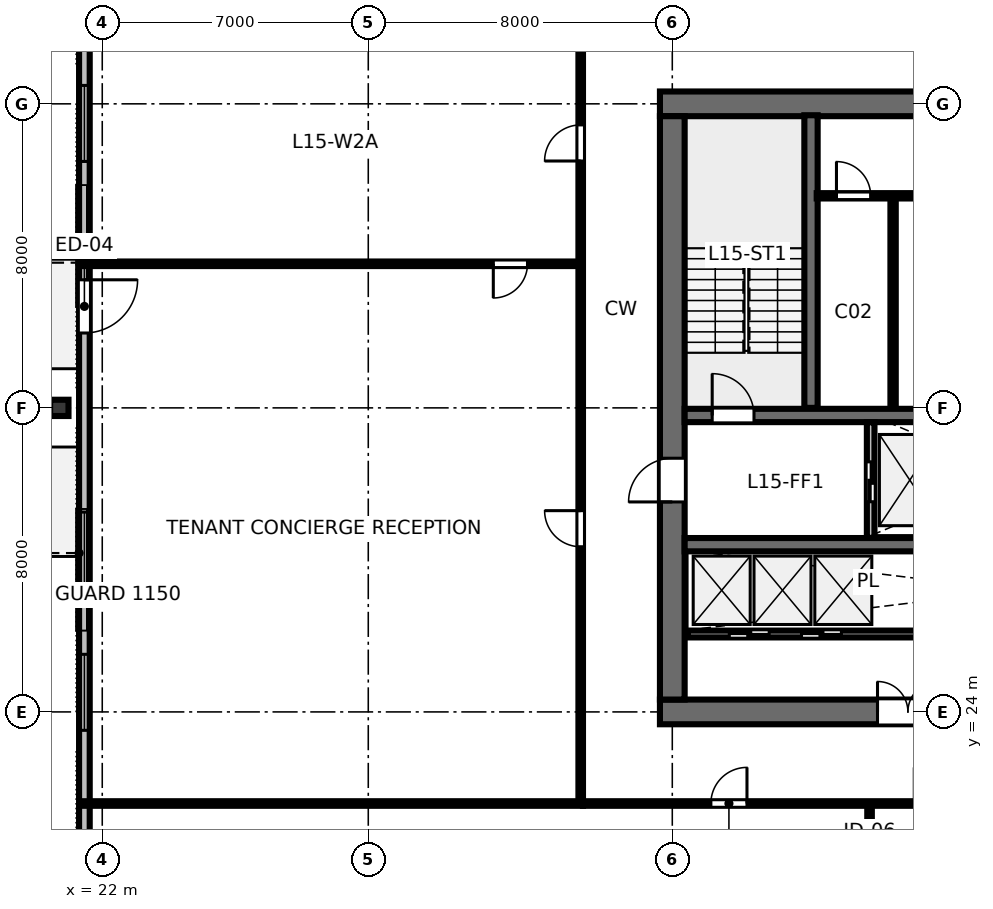
"""IFC4 building model, lengths in metres.
Left out: names, types, materials, properties, quantities, classifications, styles, units other than length and angle.
Written with IfcOpenShell. Run it as: python <this file> out.ifc"""

import sys

from ifc_helpers import new_model, si_unit, direction, frame, frame_2d, origin, origin_2d, place, context, subcontext, project, spatial, rectangle, i_section, extrude, element, fill, save


model = new_model("IFC4")
c1 = context("Model", 3, precision=1e-05, world=origin(), true_north=direction((0.0, 1.0)))
c2 = subcontext(c1, "Body", "Model", "MODEL_VIEW")
j1 = project(units=[si_unit("LENGTHUNIT", "METRE"), si_unit("PLANEANGLEUNIT", "RADIAN")], contexts=[c1])
p1 = place(None, origin())
s1 = spatial("IfcSite", under=j1, at=p1, CompositionType="ELEMENT")
p2 = place(p1, origin())
s2 = spatial("IfcBuilding", under=s1, at=p2, CompositionType="ELEMENT")
p3 = place(p2, frame((0.0, 0.0, 60.4)))
s3 = spatial("IfcBuildingStorey", under=s2, at=p3, CompositionType="ELEMENT", Elevation=60.4)
p4 = place(p3, frame((36.675, 24.0, 0.0), z_axis=(0.0, 0.0, 1.0), x_axis=(1.0, 0.0, 0.0)))
e1 = element("IfcWall", 1, at=p4, inside=s3, PredefinedType="SHEAR", context=c2, shape_type="SweptSolid", body=[
    extrude(rectangle(XDim=18.65, YDim=0.65, at=frame_2d((9.325, 0.0))), origin(), (0.0, 0.0, 1.0), 3.36),
])
p5 = place(p4, frame((5.725, 0.0, 0.0)))
e2 = element("IfcOpeningElement", 2, at=p5, cuts=e1, PredefinedType="OPENING", context=c2, shape_type="SweptSolid", body=[
    extrude(rectangle(XDim=1.6, YDim=2.15, at=frame_2d((0.8, 1.075))), frame((0.0, 0.335, 0.0), z_axis=(0.0, -1.0, 0.0), x_axis=(1.0, 0.0, 0.0)), (0.0, 0.0, 1.0), 0.67),
])
p6 = place(p4, frame((12.125, 0.0, 0.0)))
e3 = element("IfcOpeningElement", 3, at=p6, cuts=e1, PredefinedType="OPENING", context=c2, shape_type="SweptSolid", body=[
    extrude(rectangle(XDim=1.6, YDim=2.15, at=frame_2d((0.8, 1.075))), frame((0.0, 0.335, 0.0), z_axis=(0.0, -1.0, 0.0), x_axis=(1.0, 0.0, 0.0)), (0.0, 0.0, 1.0), 0.67),
])
p7 = place(p3, frame((36.675, 40.0, 0.0), z_axis=(0.0, 0.0, 1.0), x_axis=(1.0, 0.0, 0.0)))
e4 = element("IfcWall", 4, at=p7, inside=s3, PredefinedType="SHEAR", context=c2, shape_type="SweptSolid", body=[
    extrude(rectangle(XDim=18.65, YDim=0.65, at=frame_2d((9.325, 0.0))), origin(), (0.0, 0.0, 1.0), 3.36),
])
p8 = place(p7, frame((8.825, 0.0, 0.0)))
e5 = element("IfcOpeningElement", 5, at=p8, cuts=e4, PredefinedType="OPENING", context=c2, shape_type="SweptSolid", body=[
    extrude(rectangle(XDim=1.0, YDim=2.15, at=frame_2d((0.5, 1.075))), frame((0.0, 0.335, 0.0), z_axis=(0.0, -1.0, 0.0), x_axis=(1.0, 0.0, 0.0)), (0.0, 0.0, 1.0), 0.67),
])
p9 = place(p3, frame((37.0, 24.325, 0.0), z_axis=(0.0, 0.0, 1.0), x_axis=(0.0, 1.0, 0.0)))
e6 = element("IfcWall", 6, at=p9, inside=s3, PredefinedType="SHEAR", context=c2, shape_type="SweptSolid", body=[
    extrude(rectangle(XDim=15.35, YDim=0.65, at=frame_2d((7.675, 0.0))), origin(), (0.0, 0.0, 1.0), 3.36),
])
p10 = place(p9, frame((5.2, 0.0, 0.0)))
e7 = element("IfcOpeningElement", 7, at=p10, cuts=e6, PredefinedType="OPENING", context=c2, shape_type="SweptSolid", body=[
    extrude(rectangle(XDim=1.15, YDim=2.15, at=frame_2d((0.575, 1.075))), frame((0.0, 0.335, 0.0), z_axis=(0.0, -1.0, 0.0), x_axis=(1.0, 0.0, 0.0)), (0.0, 0.0, 1.0), 0.67),
])
p11 = place(p3, frame((37.325, 31.8, 0.0), z_axis=(0.0, 0.0, 1.0), x_axis=(1.0, 0.0, 0.0)))
e8 = element("IfcWall", 8, at=p11, inside=s3, PredefinedType="SHEAR", context=c2, shape_type="SweptSolid", body=[
    extrude(rectangle(XDim=17.35, YDim=0.35, at=frame_2d((8.675, 0.0))), origin(), (0.0, 0.0, 1.0), 3.36),
])
p12 = place(p11, frame((0.725, 0.0, 0.0)))
e9 = element("IfcOpeningElement", 9, at=p12, cuts=e8, PredefinedType="OPENING", context=c2, shape_type="SweptSolid", body=[
    extrude(rectangle(XDim=1.1, YDim=2.15, at=frame_2d((0.55, 1.075))), frame((0.0, 0.185, 0.0), z_axis=(0.0, -1.0, 0.0), x_axis=(1.0, 0.0, 0.0)), (0.0, 0.0, 1.0), 0.37),
])
p13 = place(p11, frame((14.625, 0.0, 0.0)))
e10 = element("IfcOpeningElement", 10, at=p13, cuts=e8, PredefinedType="OPENING", context=c2, shape_type="SweptSolid", body=[
    extrude(rectangle(XDim=1.1, YDim=2.15, at=frame_2d((0.55, 1.075))), frame((0.0, 0.185, 0.0), z_axis=(0.0, -1.0, 0.0), x_axis=(1.0, 0.0, 0.0)), (0.0, 0.0, 1.0), 0.37),
])
p14 = place(p3, frame((37.325, 28.4, 0.0), z_axis=(0.0, 0.0, 1.0), x_axis=(1.0, 0.0, 0.0)))
e11 = element("IfcWall", 11, at=p14, inside=s3, PredefinedType="SHEAR", context=c2, shape_type="SweptSolid", body=[
    extrude(rectangle(XDim=17.35, YDim=0.35, at=frame_2d((8.675, 0.0))), origin(), (0.0, 0.0, 1.0), 3.36),
])
p15 = place(p3, frame((20.87, 32.0, 0.0), z_axis=(0.0, 0.0, 1.0), x_axis=(0.0, 1.0, 0.0)))
e12 = element("IfcColumn", 12, at=p15, inside=s3, PredefinedType="COLUMN", context=c2, shape_type="SweptSolid", body=[
    extrude(i_section(OverallWidth=0.428, OverallDepth=0.483, WebThickness=0.051, FlangeThickness=0.082, FilletRadius=0.025, at=origin_2d()), origin(), (0.0, 0.0, 1.0), 3.358),
])
p16 = place(p3, frame((21.53, 49.94, 0.0), z_axis=(0.0, 0.0, 1.0), x_axis=(0.0, -1.0, 0.0)))
e13 = element("IfcWall", 13, at=p16, inside=s3, PredefinedType="STANDARD", context=c2, shape_type="SweptSolid", body=[
    extrude(rectangle(XDim=35.88, YDim=0.28, at=frame_2d((17.94, 0.0))), origin(), (0.0, 0.0, 1.0), 3.36),
])
p17 = place(p16, frame((14.57, 0.0, 0.0)))
e14 = element("IfcOpeningElement", 14, at=p17, cuts=e13, PredefinedType="OPENING", context=c2, shape_type="SweptSolid", body=[
    extrude(rectangle(XDim=1.4, YDim=2.15, at=frame_2d((0.7, 1.075))), frame((0.0, 0.15, 0.0), z_axis=(0.0, -1.0, 0.0), x_axis=(1.0, 0.0, 0.0)), (0.0, 0.0, 1.0), 0.3),
])
p18 = place(p16, frame((1.971, 0.0, 0.8)))
e15 = element("IfcOpeningElement", 15, at=p18, cuts=e13, PredefinedType="OPENING", context=c2, shape_type="SweptSolid", body=[
    extrude(rectangle(XDim=2.0, YDim=1.95, at=frame_2d((1.0, 0.975))), frame((0.0, 0.15, 0.0), z_axis=(0.0, -1.0, 0.0), x_axis=(1.0, 0.0, 0.0)), (0.0, 0.0, 1.0), 0.3),
])
p19 = place(p16, frame((9.456, 0.0, 0.8)))
e16 = element("IfcOpeningElement", 16, at=p19, cuts=e13, PredefinedType="OPENING", context=c2, shape_type="SweptSolid", body=[
    extrude(rectangle(XDim=2.0, YDim=1.95, at=frame_2d((1.0, 0.975))), frame((0.0, 0.15, 0.0), z_axis=(0.0, -1.0, 0.0), x_axis=(1.0, 0.0, 0.0)), (0.0, 0.0, 1.0), 0.3),
])
p20 = place(p16, frame((20.682, 0.0, 0.8)))
e17 = element("IfcOpeningElement", 17, at=p20, cuts=e13, PredefinedType="OPENING", context=c2, shape_type="SweptSolid", body=[
    extrude(rectangle(XDim=2.0, YDim=1.95, at=frame_2d((1.0, 0.975))), frame((0.0, 0.15, 0.0), z_axis=(0.0, -1.0, 0.0), x_axis=(1.0, 0.0, 0.0)), (0.0, 0.0, 1.0), 0.3),
])
p21 = place(p16, frame((24.424, 0.0, 0.8)))
e18 = element("IfcOpeningElement", 18, at=p21, cuts=e13, PredefinedType="OPENING", context=c2, shape_type="SweptSolid", body=[
    extrude(rectangle(XDim=2.0, YDim=1.95, at=frame_2d((1.0, 0.975))), frame((0.0, 0.15, 0.0), z_axis=(0.0, -1.0, 0.0), x_axis=(1.0, 0.0, 0.0)), (0.0, 0.0, 1.0), 0.3),
])
p22 = place(p16, frame((31.909, 0.0, 0.8)))
e19 = element("IfcOpeningElement", 19, at=p22, cuts=e13, PredefinedType="OPENING", context=c2, shape_type="SweptSolid", body=[
    extrude(rectangle(XDim=2.0, YDim=1.95, at=frame_2d((1.0, 0.975))), frame((0.0, 0.15, 0.0), z_axis=(0.0, -1.0, 0.0), x_axis=(1.0, 0.0, 0.0)), (0.0, 0.0, 1.0), 0.3),
])
p23 = place(p3, frame((40.65, 32.0, 0.0), z_axis=(0.0, 0.0, 1.0), x_axis=(0.0, 1.0, 0.0)))
e20 = element("IfcWall", 20, at=p23, inside=s3, PredefinedType="SHEAR", context=c2, shape_type="SweptSolid", body=[
    extrude(rectangle(XDim=7.7, YDim=0.35, at=frame_2d((3.85, 0.0))), origin(), (0.0, 0.0, 1.0), 3.6),
])
p24 = place(p3, frame((42.81, 32.05, 0.0), z_axis=(0.0, 0.0, 1.0), x_axis=(0.0, 1.0, 0.0)))
e21 = element("IfcWall", 21, at=p24, inside=s3, PredefinedType="PARTITIONING", context=c2, shape_type="SweptSolid", body=[
    extrude(rectangle(XDim=5.5, YDim=0.14, at=frame_2d((2.75, 0.0))), origin(), (0.0, 0.0, 1.0), 3.36),
])
p25 = place(p3, frame((40.8, 37.58, 0.0), z_axis=(0.0, 0.0, 1.0), x_axis=(1.0, 0.0, 0.0)))
e22 = element("IfcWall", 22, at=p25, inside=s3, PredefinedType="PARTITIONING", context=c2, shape_type="SweptSolid", body=[
    extrude(rectangle(XDim=10.4, YDim=0.14, at=frame_2d((5.2, 0.0))), origin(), (0.0, 0.0, 1.0), 3.36),
])
p26 = place(p25, frame((0.52, 0.0, 0.0)))
e23 = element("IfcOpeningElement", 23, at=p26, cuts=e22, PredefinedType="OPENING", context=c2, shape_type="SweptSolid", body=[
    extrude(rectangle(XDim=0.9, YDim=2.15, at=frame_2d((0.45, 1.075))), frame((0.0, 0.08, 0.0), z_axis=(0.0, -1.0, 0.0), x_axis=(1.0, 0.0, 0.0)), (0.0, 0.0, 1.0), 0.16),
])
p27 = place(p25, frame((2.6, 0.0, 0.0)))
e24 = element("IfcOpeningElement", 24, at=p27, cuts=e22, PredefinedType="OPENING", context=c2, shape_type="SweptSolid", body=[
    extrude(rectangle(XDim=0.9, YDim=2.15, at=frame_2d((0.45, 1.075))), frame((0.0, 0.08, 0.0), z_axis=(0.0, -1.0, 0.0), x_axis=(1.0, 0.0, 0.0)), (0.0, 0.0, 1.0), 0.16),
])
p28 = place(p25, frame((4.68, 0.0, 0.0)))
e25 = element("IfcOpeningElement", 25, at=p28, cuts=e22, PredefinedType="OPENING", context=c2, shape_type="SweptSolid", body=[
    extrude(rectangle(XDim=0.92, YDim=2.15, at=frame_2d((0.46, 1.075))), frame((0.0, 0.08, 0.0), z_axis=(0.0, -1.0, 0.0), x_axis=(1.0, 0.0, 0.0)), (0.0, 0.0, 1.0), 0.16),
])
p29 = place(p25, frame((6.76, 0.0, 0.0)))
e26 = element("IfcOpeningElement", 26, at=p29, cuts=e22, PredefinedType="OPENING", context=c2, shape_type="SweptSolid", body=[
    extrude(rectangle(XDim=0.9, YDim=2.15, at=frame_2d((0.45, 1.075))), frame((0.0, 0.08, 0.0), z_axis=(0.0, -1.0, 0.0), x_axis=(1.0, 0.0, 0.0)), (0.0, 0.0, 1.0), 0.16),
])
p30 = place(p25, frame((8.84, 0.0, 0.0)))
e27 = element("IfcOpeningElement", 27, at=p30, cuts=e22, PredefinedType="OPENING", context=c2, shape_type="SweptSolid", body=[
    extrude(rectangle(XDim=0.9, YDim=2.15, at=frame_2d((0.45, 1.075))), frame((0.0, 0.08, 0.0), z_axis=(0.0, -1.0, 0.0), x_axis=(1.0, 0.0, 0.0)), (0.0, 0.0, 1.0), 0.16),
])
p31 = place(p3, frame((42.22, 28.58, 0.0), z_axis=(0.0, 0.0, 1.0), x_axis=(0.0, 1.0, 0.0)))
e28 = element("IfcWall", 28, at=p31, inside=s3, PredefinedType="PARTITIONING", context=c2, shape_type="SweptSolid", body=[
    extrude(rectangle(XDim=3.04, YDim=0.2, at=frame_2d((1.52, 0.0))), origin(), (0.0, 0.0, 1.0), 3.36),
])
p32 = place(p31, frame((0.95, 0.0, 0.0)))
e29 = element("IfcOpeningElement", 29, at=p32, cuts=e28, PredefinedType="OPENING", context=c2, shape_type="SweptSolid", body=[
    extrude(rectangle(XDim=1.05, YDim=2.15, at=frame_2d((0.525, 1.075))), frame((0.0, 0.11, 0.0), z_axis=(0.0, -1.0, 0.0), x_axis=(1.0, 0.0, 0.0)), (0.0, 0.0, 1.0), 0.22),
])
p33 = place(p3, frame((37.4, 26.05, 0.0), z_axis=(0.0, 0.0, 1.0), x_axis=(1.0, 0.0, 0.0)))
e30 = element("IfcWall", 30, at=p33, inside=s3, PredefinedType="PARTITIONING", context=c2, shape_type="SweptSolid", body=[
    extrude(rectangle(XDim=17.2, YDim=0.18, at=frame_2d((8.6, 0.0))), origin(), (0.0, 0.0, 1.0), 3.36),
])
p34 = place(p33, frame((1.1, 0.0, 0.0)))
e31 = element("IfcOpeningElement", 31, at=p34, cuts=e30, PredefinedType="OPENING", context=c2, shape_type="SweptSolid", body=[
    extrude(rectangle(XDim=1.05, YDim=2.15, at=frame_2d((0.525, 1.075))), frame((0.0, 0.1, 0.0), z_axis=(0.0, -1.0, 0.0), x_axis=(1.0, 0.0, 0.0)), (0.0, 0.0, 1.0), 0.2),
])
p35 = place(p33, frame((3.0, 0.0, 0.0)))
e32 = element("IfcOpeningElement", 32, at=p35, cuts=e30, PredefinedType="OPENING", context=c2, shape_type="SweptSolid", body=[
    extrude(rectangle(XDim=1.05, YDim=2.15, at=frame_2d((0.525, 1.075))), frame((0.0, 0.1, 0.0), z_axis=(0.0, -1.0, 0.0), x_axis=(1.0, 0.0, 0.0)), (0.0, 0.0, 1.0), 0.2),
])
p36 = place(p3, frame((42.191, 21.59, 0.0), z_axis=(0.0, 0.0, 1.0), x_axis=(0.0, -1.0, 0.0)))
e33 = element("IfcWall", 33, at=p36, inside=s3, PredefinedType="PARTITIONING", context=c2, shape_type="SweptSolid", body=[
    extrude(rectangle(XDim=11.11, YDim=0.12, at=frame_2d((5.555, 0.0))), origin(), (0.0, 0.0, 1.0), 2.64),
])
p37 = place(p36, frame((1.4, 0.0, 0.0)))
e34 = element("IfcOpeningElement", 34, at=p37, cuts=e33, PredefinedType="OPENING", context=c2, shape_type="SweptSolid", body=[
    extrude(rectangle(XDim=0.9, YDim=2.15, at=frame_2d((0.45, 1.075))), frame((0.0, 0.07, 0.0), z_axis=(0.0, -1.0, 0.0), x_axis=(1.0, 0.0, 0.0)), (0.0, 0.0, 1.0), 0.14),
])
p38 = place(p3, frame((34.65, 21.59, 0.0), z_axis=(0.0, 0.0, 1.0), x_axis=(1.0, 0.0, 0.0)))
e35 = element("IfcWall", 35, at=p38, inside=s3, PredefinedType="PARTITIONING", context=c2, shape_type="SweptSolid", body=[
    extrude(rectangle(XDim=22.7, YDim=0.12, at=frame_2d((11.35, 0.0))), origin(), (0.0, 0.0, 1.0), 2.64),
])
p39 = place(p38, frame((3.365, 0.0, 0.0)))
e36 = element("IfcOpeningElement", 36, at=p39, cuts=e35, PredefinedType="OPENING", context=c2, shape_type="SweptSolid", body=[
    extrude(rectangle(XDim=0.95, YDim=2.15, at=frame_2d((0.475, 1.075))), frame((0.0, 0.07, 0.0), z_axis=(0.0, -1.0, 0.0), x_axis=(1.0, 0.0, 0.0)), (0.0, 0.0, 1.0), 0.14),
])
p40 = place(p38, frame((8.718, 0.0, 0.0)))
e37 = element("IfcOpeningElement", 37, at=p40, cuts=e35, PredefinedType="OPENING", context=c2, shape_type="SweptSolid", body=[
    extrude(rectangle(XDim=0.95, YDim=2.15, at=frame_2d((0.475, 1.075))), frame((0.0, 0.07, 0.0), z_axis=(0.0, -1.0, 0.0), x_axis=(1.0, 0.0, 0.0)), (0.0, 0.0, 1.0), 0.14),
])
p41 = place(p38, frame((13.651, 0.0, 0.0)))
e38 = element("IfcOpeningElement", 38, at=p41, cuts=e35, PredefinedType="OPENING", context=c2, shape_type="SweptSolid", body=[
    extrude(rectangle(XDim=0.95, YDim=2.15, at=frame_2d((0.475, 1.075))), frame((0.0, 0.07, 0.0), z_axis=(0.0, -1.0, 0.0), x_axis=(1.0, 0.0, 0.0)), (0.0, 0.0, 1.0), 0.14),
])
p42 = place(p38, frame((19.509, 0.0, 0.0)))
e39 = element("IfcOpeningElement", 39, at=p42, cuts=e35, PredefinedType="OPENING", context=c2, shape_type="SweptSolid", body=[
    extrude(rectangle(XDim=0.95, YDim=2.15, at=frame_2d((0.475, 1.075))), frame((0.0, 0.07, 0.0), z_axis=(0.0, -1.0, 0.0), x_axis=(1.0, 0.0, 0.0)), (0.0, 0.0, 1.0), 0.14),
])
p43 = place(p3, frame((34.59, 35.791, 0.0), z_axis=(0.0, 0.0, 1.0), x_axis=(-1.0, 0.0, 0.0)))
e40 = element("IfcWall", 40, at=p43, inside=s3, PredefinedType="PARTITIONING", context=c2, shape_type="SweptSolid", body=[
    extrude(rectangle(XDim=13.06, YDim=0.12, at=frame_2d((6.53, 0.0))), origin(), (0.0, 0.0, 1.0), 2.64),
])
p44 = place(p43, frame((1.4, 0.0, 0.0)))
e41 = element("IfcOpeningElement", 41, at=p44, cuts=e40, PredefinedType="OPENING", context=c2, shape_type="SweptSolid", body=[
    extrude(rectangle(XDim=0.9, YDim=2.15, at=frame_2d((0.45, 1.075))), frame((0.0, 0.07, 0.0), z_axis=(0.0, -1.0, 0.0), x_axis=(1.0, 0.0, 0.0)), (0.0, 0.0, 1.0), 0.14),
])
p45 = place(p3, frame((34.59, 21.65, 0.0), z_axis=(0.0, 0.0, 1.0), x_axis=(0.0, 1.0, 0.0)))
e42 = element("IfcWall", 42, at=p45, inside=s3, PredefinedType="PARTITIONING", context=c2, shape_type="SweptSolid", body=[
    extrude(rectangle(XDim=20.7, YDim=0.12, at=frame_2d((10.35, 0.0))), origin(), (0.0, 0.0, 1.0), 2.64),
])
p46 = place(p45, frame((6.696, 0.0, 0.0)))
e43 = element("IfcOpeningElement", 43, at=p46, cuts=e42, PredefinedType="OPENING", context=c2, shape_type="SweptSolid", body=[
    extrude(rectangle(XDim=0.95, YDim=2.15, at=frame_2d((0.475, 1.075))), frame((0.0, 0.07, 0.0), z_axis=(0.0, -1.0, 0.0), x_axis=(1.0, 0.0, 0.0)), (0.0, 0.0, 1.0), 0.14),
])
p47 = place(p45, frame((16.846, 0.0, 0.0)))
e44 = element("IfcOpeningElement", 44, at=p47, cuts=e42, PredefinedType="OPENING", context=c2, shape_type="SweptSolid", body=[
    extrude(rectangle(XDim=0.95, YDim=2.15, at=frame_2d((0.475, 1.075))), frame((0.0, 0.07, 0.0), z_axis=(0.0, -1.0, 0.0), x_axis=(1.0, 0.0, 0.0)), (0.0, 0.0, 1.0), 0.14),
])
p48 = place(p3, frame((34.65, 21.59, 0.0), z_axis=(0.0, 0.0, 1.0), x_axis=(-1.0, 0.0, 0.0)))
e45 = element("IfcWall", 45, at=p48, inside=s3, PredefinedType="PARTITIONING", context=c2, shape_type="SweptSolid", body=[
    extrude(rectangle(XDim=13.12, YDim=0.12, at=frame_2d((6.56, 0.0))), origin(), (0.0, 0.0, 1.0), 2.64),
])
p49 = place(p17, origin())
e46 = element("IfcDoor", 46, at=p49, inside=s3, OperationType="SINGLE_SWING_LEFT", PredefinedType="DOOR", context=c2, shape_type="SweptSolid", body=[
    extrude(rectangle(XDim=1.4, YDim=2.15, at=frame_2d((0.7, 1.075))), frame((0.0, 0.025, 0.0), z_axis=(0.0, -1.0, 0.0), x_axis=(1.0, 0.0, 0.0)), (0.0, 0.0, 1.0), 0.05),
])
fill(e14, e46)
p50 = place(p19, origin())
e47 = element("IfcWindow", 47, at=p50, inside=s3, PartitioningType="SINGLE_PANEL", PredefinedType="WINDOW", context=c2, shape_type="SweptSolid", body=[
    extrude(rectangle(XDim=2.0, YDim=1.95, at=frame_2d((1.0, 0.975))), frame((0.0, 0.03, 0.0), z_axis=(0.0, -1.0, 0.0), x_axis=(1.0, 0.0, 0.0)), (0.0, 0.0, 1.0), 0.06),
])
fill(e16, e47)
p51 = place(p20, origin())
e48 = element("IfcWindow", 48, at=p51, inside=s3, PartitioningType="SINGLE_PANEL", PredefinedType="WINDOW", context=c2, shape_type="SweptSolid", body=[
    extrude(rectangle(XDim=2.0, YDim=1.95, at=frame_2d((1.0, 0.975))), frame((0.0, 0.03, 0.0), z_axis=(0.0, -1.0, 0.0), x_axis=(1.0, 0.0, 0.0)), (0.0, 0.0, 1.0), 0.06),
])
fill(e17, e48)
p52 = place(p21, origin())
e49 = element("IfcWindow", 49, at=p52, inside=s3, PartitioningType="SINGLE_PANEL", PredefinedType="WINDOW", context=c2, shape_type="SweptSolid", body=[
    extrude(rectangle(XDim=2.0, YDim=1.95, at=frame_2d((1.0, 0.975))), frame((0.0, 0.03, 0.0), z_axis=(0.0, -1.0, 0.0), x_axis=(1.0, 0.0, 0.0)), (0.0, 0.0, 1.0), 0.06),
])
fill(e18, e49)
p53 = place(p12, origin())
e50 = element("IfcDoor", 50, at=p53, inside=s3, OperationType="SINGLE_SWING_LEFT", PredefinedType="DOOR", context=c2, shape_type="SweptSolid", body=[
    extrude(rectangle(XDim=1.1, YDim=2.15, at=frame_2d((0.55, 1.075))), frame((0.0, 0.025, 0.0), z_axis=(0.0, -1.0, 0.0), x_axis=(1.0, 0.0, 0.0)), (0.0, 0.0, 1.0), 0.05),
])
fill(e9, e50)
p54 = place(p10, origin())
e51 = element("IfcDoor", 51, at=p54, inside=s3, OperationType="SINGLE_SWING_LEFT", PredefinedType="DOOR", context=c2, shape_type="SweptSolid", body=[
    extrude(rectangle(XDim=1.15, YDim=2.15, at=frame_2d((0.575, 1.075))), frame((0.0, 0.025, 0.0), z_axis=(0.0, -1.0, 0.0), x_axis=(1.0, 0.0, 0.0)), (0.0, 0.0, 1.0), 0.05),
])
fill(e7, e51)
p55 = place(p5, origin())
e52 = element("IfcDoor", 52, at=p55, inside=s3, OperationType="DOUBLE_DOOR_SINGLE_SWING", PredefinedType="DOOR", context=c2, shape_type="SweptSolid", body=[
    extrude(rectangle(XDim=1.6, YDim=2.15, at=frame_2d((0.8, 1.075))), frame((0.0, 0.025, 0.0), z_axis=(0.0, -1.0, 0.0), x_axis=(1.0, 0.0, 0.0)), (0.0, 0.0, 1.0), 0.05),
])
fill(e2, e52)
p56 = place(p26, origin())
e53 = element("IfcDoor", 53, at=p56, inside=s3, OperationType="SINGLE_SWING_LEFT", PredefinedType="DOOR", context=c2, shape_type="SweptSolid", body=[
    extrude(rectangle(XDim=0.9, YDim=2.15, at=frame_2d((0.45, 1.075))), frame((0.0, 0.025, 0.0), z_axis=(0.0, -1.0, 0.0), x_axis=(1.0, 0.0, 0.0)), (0.0, 0.0, 1.0), 0.05),
])
fill(e23, e53)
p57 = place(p32, origin())
e54 = element("IfcDoor", 54, at=p57, inside=s3, OperationType="SLIDING_TO_LEFT", PredefinedType="DOOR", context=c2, shape_type="SweptSolid", body=[
    extrude(rectangle(XDim=1.05, YDim=2.15, at=frame_2d((0.525, 1.075))), frame((0.0, 0.025, 0.0), z_axis=(0.0, -1.0, 0.0), x_axis=(1.0, 0.0, 0.0)), (0.0, 0.0, 1.0), 0.05),
])
fill(e29, e54)
p58 = place(p34, origin())
e55 = element("IfcDoor", 55, at=p58, inside=s3, OperationType="SLIDING_TO_LEFT", PredefinedType="DOOR", context=c2, shape_type="SweptSolid", body=[
    extrude(rectangle(XDim=1.05, YDim=2.15, at=frame_2d((0.525, 1.075))), frame((0.0, 0.025, 0.0), z_axis=(0.0, -1.0, 0.0), x_axis=(1.0, 0.0, 0.0)), (0.0, 0.0, 1.0), 0.05),
])
fill(e31, e55)
p59 = place(p35, origin())
e56 = element("IfcDoor", 56, at=p59, inside=s3, OperationType="SLIDING_TO_RIGHT", PredefinedType="DOOR", context=c2, shape_type="SweptSolid", body=[
    extrude(rectangle(XDim=1.05, YDim=2.15, at=frame_2d((0.525, 1.075))), frame((0.0, 0.025, 0.0), z_axis=(0.0, -1.0, 0.0), x_axis=(1.0, 0.0, 0.0)), (0.0, 0.0, 1.0), 0.05),
])
fill(e32, e56)
p60 = place(p39, origin())
e57 = element("IfcDoor", 57, at=p60, inside=s3, OperationType="SINGLE_SWING_RIGHT", PredefinedType="DOOR", context=c2, shape_type="SweptSolid", body=[
    extrude(rectangle(XDim=0.95, YDim=2.15, at=frame_2d((0.475, 1.075))), frame((0.0, 0.025, 0.0), z_axis=(0.0, -1.0, 0.0), x_axis=(1.0, 0.0, 0.0)), (0.0, 0.0, 1.0), 0.05),
])
fill(e36, e57)
p61 = place(p44, origin())
e58 = element("IfcDoor", 58, at=p61, inside=s3, OperationType="SINGLE_SWING_RIGHT", PredefinedType="DOOR", context=c2, shape_type="SweptSolid", body=[
    extrude(rectangle(XDim=0.9, YDim=2.15, at=frame_2d((0.45, 1.075))), frame((0.0, 0.025, 0.0), z_axis=(0.0, -1.0, 0.0), x_axis=(1.0, 0.0, 0.0)), (0.0, 0.0, 1.0), 0.05),
])
fill(e41, e58)
p62 = place(p46, origin())
e59 = element("IfcDoor", 59, at=p62, inside=s3, OperationType="SINGLE_SWING_RIGHT", PredefinedType="DOOR", context=c2, shape_type="SweptSolid", body=[
    extrude(rectangle(XDim=0.95, YDim=2.15, at=frame_2d((0.475, 1.075))), frame((0.0, 0.025, 0.0), z_axis=(0.0, -1.0, 0.0), x_axis=(1.0, 0.0, 0.0)), (0.0, 0.0, 1.0), 0.05),
])
fill(e43, e59)
p63 = place(p47, origin())
e60 = element("IfcDoor", 60, at=p63, inside=s3, OperationType="SINGLE_SWING_LEFT", PredefinedType="DOOR", context=c2, shape_type="SweptSolid", body=[
    extrude(rectangle(XDim=0.95, YDim=2.15, at=frame_2d((0.475, 1.075))), frame((0.0, 0.025, 0.0), z_axis=(0.0, -1.0, 0.0), x_axis=(1.0, 0.0, 0.0)), (0.0, 0.0, 1.0), 0.05),
])
fill(e44, e60)
save(model, sys.argv[1])
